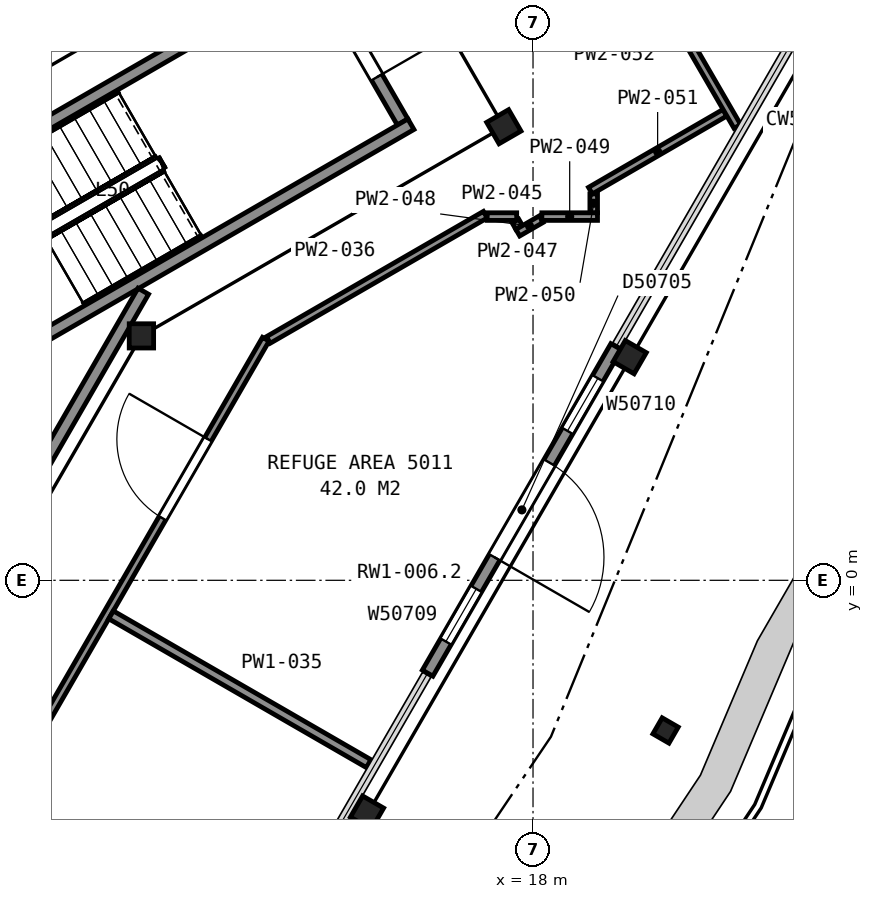
"""IFC4 building model, lengths in metres.
Left out: names, types, materials, properties, quantities, classifications, styles, units other than length and angle.
Written with IfcOpenShell. Run it as: python <this file> out.ifc"""

import sys

from ifc_helpers import new_model, si_unit, direction, frame, frame_2d, origin, origin_2d, place, context, subcontext, project, spatial, rectangle, hollow_rectangle, i_section, extrude, element, fill, save


model = new_model("IFC4")
c1 = context("Model", 3, precision=1e-05, world=origin(), true_north=direction((0.0, 1.0)))
c2 = subcontext(c1, "Body", "Model", "MODEL_VIEW")
j1 = project(units=[si_unit("LENGTHUNIT", "METRE"), si_unit("PLANEANGLEUNIT", "RADIAN")], contexts=[c1])
p1 = place(None, origin())
s1 = spatial("IfcSite", under=j1, at=p1, CompositionType="ELEMENT")
p2 = place(p1, origin())
s2 = spatial("IfcBuilding", under=s1, at=p2, CompositionType="ELEMENT")
p3 = place(p2, frame((0.0, 0.0, 200.6)))
s3 = spatial("IfcBuildingStorey", under=s2, at=p3, CompositionType="ELEMENT", Elevation=200.6)
for number, where, z_axis, x_axis in (
    (1, (15.27, -3.82, -0.16), (0.0, 0.0, 1.0), (-0.5, -0.866, 0.0)),
    (2, (19.59, 3.67, -0.16), (0.0, 0.0, 1.0), (-0.5, -0.866, 0.0)),
):
    element("IfcColumn", number, at=place(p3, frame(where, z_axis=z_axis, x_axis=x_axis)), inside=s3, PredefinedType="COLUMN", context=c2, shape_type="SweptSolid", body=[
        extrude(i_section(OverallWidth=0.401, OverallDepth=0.399, WebThickness=0.025, FlangeThickness=0.04, FilletRadius=0.015, at=origin_2d()), origin(), (0.0, 0.0, 1.0), 5.96),
    ])
p4 = place(p3, frame((11.56, 4.02, 0.0), z_axis=(0.0, 0.0, 1.0), x_axis=(1.0, 0.0, 0.0)))
e3 = element("IfcColumn", 3, at=p4, inside=s3, PredefinedType="COLUMN", context=c2, shape_type="SweptSolid", body=[
    extrude(i_section(OverallWidth=0.401, OverallDepth=0.399, WebThickness=0.025, FlangeThickness=0.04, FilletRadius=0.015, at=origin_2d()), origin(), (0.0, 0.0, 1.0), 5.8),
])
p5 = place(p3, frame((17.52, 7.46, 0.0), z_axis=(0.0, 0.0, 1.0), x_axis=(0.5, -0.866025403784, 0.0)))
e4 = element("IfcColumn", 4, at=p5, inside=s3, PredefinedType="COLUMN", context=c2, shape_type="SweptSolid", body=[
    extrude(i_section(OverallWidth=0.406, OverallDepth=0.417, WebThickness=0.03, FlangeThickness=0.048, FilletRadius=0.015, at=origin_2d()), origin(), (0.0, 0.0, 1.0), 5.8),
])
p6 = place(p3, frame((20.18, -2.47, -0.69), z_axis=(0.0, 0.0, 1.0), x_axis=(-0.5, -0.866025403784, 0.0)))
e5 = element("IfcColumn", 5, at=p6, inside=s3, PredefinedType="COLUMN", context=c2, shape_type="SweptSolid", body=[
    extrude(hollow_rectangle(XDim=0.305, YDim=0.305, WallThickness=0.013, InnerFilletRadius=0.006, OuterFilletRadius=0.019, at=origin_2d()), origin(), (0.0, 0.0, 1.0), 5.4),
])
p7 = place(p3, frame((16.267, -1.527, 0.0), z_axis=(0.0, 0.0, 1.0), x_axis=(0.499997426962, 0.866026889324, 0.0)))
e6 = element("IfcWall", 6, at=p7, inside=s3, PredefinedType="SOLIDWALL", context=c2, shape_type="SweptSolid", body=[
    extrude(rectangle(XDim=6.2, YDim=0.2, at=frame_2d((3.1, 0.0))), origin(), (0.0, 0.0, 1.0), 4.522),
])
p8 = place(p7, frame((0.6, 0.0, 0.9)))
e7 = element("IfcOpeningElement", 7, at=p8, cuts=e6, PredefinedType="OPENING", context=c2, shape_type="SweptSolid", body=[
    extrude(rectangle(XDim=1.0, YDim=1.5, at=frame_2d((0.5, 0.75))), frame((0.0, 0.11, 0.0), z_axis=(0.0, -1.0, 0.0), x_axis=(1.0, 0.0, 0.0)), (0.0, 0.0, 1.0), 0.22),
])
p9 = place(p7, frame((2.2, 0.0, 0.0)))
e8 = element("IfcOpeningElement", 8, at=p9, cuts=e6, PredefinedType="OPENING", context=c2, shape_type="SweptSolid", body=[
    extrude(rectangle(XDim=1.8, YDim=2.4, at=frame_2d((0.9, 1.2))), frame((0.0, 0.11, 0.0), z_axis=(0.0, -1.0, 0.0), x_axis=(1.0, 0.0, 0.0)), (0.0, 0.0, 1.0), 0.22),
])
p10 = place(p7, frame((4.6, 0.0, 0.9)))
e9 = element("IfcOpeningElement", 9, at=p10, cuts=e6, PredefinedType="OPENING", context=c2, shape_type="SweptSolid", body=[
    extrude(rectangle(XDim=1.0, YDim=1.5, at=frame_2d((0.5, 0.75))), frame((0.0, 0.11, 0.0), z_axis=(0.0, -1.0, 0.0), x_axis=(1.0, 0.0, 0.0)), (0.0, 0.0, 1.0), 0.22),
])
p11 = place(p3, frame((15.855, 7.538, 0.0), z_axis=(0.0, 0.0, 1.0), x_axis=(-0.500049511043, 0.865996816683, 0.0)))
e10 = element("IfcWall", 10, at=p11, inside=s3, PredefinedType="PARTITIONING", context=c2, shape_type="SweptSolid", body=[
    extrude(rectangle(XDim=2.8, YDim=0.2, at=frame_2d((1.4, 0.0))), origin(), (0.0, 0.0, 1.0), 5.55),
])
p12 = place(p11, frame((0.85, 0.0, 0.0)))
e11 = element("IfcOpeningElement", 11, at=p12, cuts=e10, PredefinedType="OPENING", context=c2, shape_type="SweptSolid", body=[
    extrude(rectangle(XDim=1.1, YDim=2.1, at=frame_2d((0.55, 1.05))), frame((0.0, 0.11, 0.0), z_axis=(0.0, -1.0, 0.0), x_axis=(1.0, 0.0, 0.0)), (0.0, 0.0, 1.0), 0.22),
])
for number, where, z_axis, x_axis in (
    (12, (6.178, 5.299, 0.0), (0.0, 0.0, 1.0), (0.866, 0.5, 0.0)),
    (13, (7.678, 2.701, 0.0), (0.0, 0.0, 1.0), (0.866, 0.5, 0.0)),
):
    element("IfcWall", number, at=place(p3, frame(where, z_axis=z_axis, x_axis=x_axis)), inside=s3, PredefinedType="PARTITIONING", context=c2, shape_type="SweptSolid", body=[
        extrude(rectangle(XDim=9.6, YDim=0.2, at=frame_2d((4.8, 0.0))), origin(), (0.0, 0.0, 1.0), 5.55),
    ])
p13 = place(p3, frame((9.803, 1.658, 0.0), z_axis=(0.0, 0.0, 1.0), x_axis=(0.499943114462, 0.866058244174, 0.0)))
e14 = element("IfcWall", 14, at=p13, inside=s3, PredefinedType="PARTITIONING", context=c2, shape_type="SweptSolid", body=[
    extrude(rectangle(XDim=3.576, YDim=0.2, at=frame_2d((1.788, 0.0))), origin(), (0.0, 0.0, 1.0), 5.55),
])
p14 = place(p3, frame((13.605, 3.965, 0.0), z_axis=(0.0, 0.0, 1.0), x_axis=(-0.499989213553, -0.866031631253, 0.0)))
e15 = element("IfcWall", 15, at=p14, inside=s3, PredefinedType="PARTITIONING", context=c2, shape_type="SweptSolid", body=[
    extrude(rectangle(XDim=19.41, YDim=0.125, at=frame_2d((9.705, 0.0))), origin(), (0.0, 0.0, 1.0), 4.462),
])
p15 = place(p14, frame((1.899, 0.0, 0.0)))
e16 = element("IfcOpeningElement", 16, at=p15, cuts=e15, PredefinedType="OPENING", context=c2, shape_type="SweptSolid", body=[
    extrude(rectangle(XDim=1.5, YDim=2.1, at=frame_2d((0.75, 1.05))), frame((0.0, 0.073, 0.0), z_axis=(0.0, -1.0, 0.0), x_axis=(1.0, 0.0, 0.0)), (0.0, 0.0, 1.0), 0.145),
])
p16 = place(p3, frame((11.06, -0.568, 0.0), z_axis=(0.0, 0.0, 1.0), x_axis=(0.865980327456, -0.500078066365, 0.0)))
e17 = element("IfcWall", 17, at=p16, inside=s3, PredefinedType="PARTITIONING", context=c2, shape_type="SweptSolid", body=[
    extrude(rectangle(XDim=4.893, YDim=0.15, at=frame_2d((2.446, 0.0))), origin(), (0.0, 0.0, 1.0), 4.462),
])
p17 = place(p3, frame((13.648, 3.954, 0.0), z_axis=(0.0, 0.0, 1.0), x_axis=(0.866031617834, 0.499989236795, 0.0)))
e18 = element("IfcWall", 18, at=p17, inside=s3, PredefinedType="PARTITIONING", context=c2, shape_type="SweptSolid", body=[
    extrude(rectangle(XDim=4.119, YDim=0.125, at=frame_2d((2.06, 0.0))), origin(), (0.0, 0.0, 1.0), 4.462),
])
p18 = place(p3, frame((17.246, 5.982, 0.0), z_axis=(0.0, 0.0, 1.0), x_axis=(1.0, 0.0, 0.0)))
e19 = element("IfcWall", 19, at=p18, inside=s3, PredefinedType="PARTITIONING", context=c2, shape_type="SweptSolid", body=[
    extrude(rectangle(XDim=0.485, YDim=0.125, at=frame_2d((0.243, 0.0))), origin(), (0.0, 0.0, 1.0), 4.462),
])
p19 = place(p3, frame((17.711, 5.908, 0.0), z_axis=(0.0, 0.0, 1.0), x_axis=(0.499195341736, -0.86648947529, 0.0)))
e20 = element("IfcWall", 20, at=p19, inside=s3, PredefinedType="PARTITIONING", context=c2, shape_type="SweptSolid", body=[
    extrude(rectangle(XDim=0.12, YDim=0.125, at=frame_2d((0.06, 0.0))), origin(), (0.0, 0.0, 1.0), 4.462),
])
p20 = place(p3, frame((17.75, 5.717, 0.0), z_axis=(0.0, 0.0, 1.0), x_axis=(0.865150363836, 0.501512560116, 0.0)))
e21 = element("IfcWall", 21, at=p20, inside=s3, PredefinedType="PARTITIONING", context=c2, shape_type="SweptSolid", body=[
    extrude(rectangle(XDim=0.444, YDim=0.125, at=frame_2d((0.222, 0.0))), origin(), (0.0, 0.0, 1.0), 4.462),
])
p21 = place(p3, frame((18.146, 5.982, 0.0), z_axis=(0.0, 0.0, 1.0), x_axis=(1.0, 0.0, 0.0)))
e22 = element("IfcWall", 22, at=p21, inside=s3, PredefinedType="PARTITIONING", context=c2, shape_type="SweptSolid", body=[
    extrude(rectangle(XDim=0.915, YDim=0.125, at=frame_2d((0.458, 0.0))), origin(), (0.0, 0.0, 1.0), 4.462),
])
p22 = place(p3, frame((18.998, 6.047, 0.0), z_axis=(0.0, 0.0, 1.0), x_axis=(0.0, 1.0, 0.0)))
e23 = element("IfcWall", 23, at=p22, inside=s3, PredefinedType="PARTITIONING", context=c2, shape_type="SweptSolid", body=[
    extrude(rectangle(XDim=0.308, YDim=0.125, at=frame_2d((0.154, 0.0))), origin(), (0.0, 0.0, 1.0), 4.462),
])
p23 = place(p3, frame((18.944, 6.409, 0.0), z_axis=(0.0, 0.0, 1.0), x_axis=(0.865299783161, 0.501254710961, 0.0)))
e24 = element("IfcWall", 24, at=p23, inside=s3, PredefinedType="PARTITIONING", context=c2, shape_type="SweptSolid", body=[
    extrude(rectangle(XDim=2.555, YDim=0.125, at=frame_2d((1.278, 0.0))), origin(), (0.0, 0.0, 1.0), 4.462),
])
p24 = place(p3, frame((19.553, 10.584, 0.0), z_axis=(0.0, 0.0, 1.0), x_axis=(0.501337933971, -0.86525156802, 0.0)))
e25 = element("IfcWall", 25, at=p24, inside=s3, PredefinedType="PARTITIONING", context=c2, shape_type="SweptSolid", body=[
    extrude(rectangle(XDim=3.604, YDim=0.125, at=frame_2d((1.802, 0.0))), origin(), (0.0, 0.0, 1.0), 4.462),
])
p25 = place(p8, origin())
e26 = element("IfcWindow", 26, at=p25, inside=s3, PartitioningType="SINGLE_PANEL", PredefinedType="WINDOW", context=c2, shape_type="SweptSolid", body=[
    extrude(rectangle(XDim=1.0, YDim=1.5, at=frame_2d((0.5, 0.75))), frame((0.0, 0.03, 0.0), z_axis=(0.0, -1.0, 0.0), x_axis=(1.0, 0.0, 0.0)), (0.0, 0.0, 1.0), 0.06),
])
fill(e7, e26)
p26 = place(p9, frame((1.8, 0.0, 0.0), z_axis=(0.0, 0.0, 1.0), x_axis=(-1.0, 0.0, 0.0)))
e27 = element("IfcDoor", 27, at=p26, inside=s3, OperationType="DOUBLE_DOOR_SINGLE_SWING", PredefinedType="DOOR", context=c2, shape_type="SweptSolid", body=[
    extrude(rectangle(XDim=1.8, YDim=2.4, at=frame_2d((0.9, 1.2))), frame((0.0, 0.025, 0.0), z_axis=(0.0, -1.0, 0.0), x_axis=(1.0, 0.0, 0.0)), (0.0, 0.0, 1.0), 0.05),
])
fill(e8, e27)
p27 = place(p10, origin())
e28 = element("IfcWindow", 28, at=p27, inside=s3, PartitioningType="SINGLE_PANEL", PredefinedType="WINDOW", context=c2, shape_type="SweptSolid", body=[
    extrude(rectangle(XDim=1.0, YDim=1.5, at=frame_2d((0.5, 0.75))), frame((0.0, 0.03, 0.0), z_axis=(0.0, -1.0, 0.0), x_axis=(1.0, 0.0, 0.0)), (0.0, 0.0, 1.0), 0.06),
])
fill(e9, e28)
p28 = place(p12, origin())
e29 = element("IfcDoor", 29, at=p28, inside=s3, OperationType="SINGLE_SWING_LEFT", PredefinedType="DOOR", context=c2, shape_type="SweptSolid", body=[
    extrude(rectangle(XDim=1.1, YDim=2.1, at=frame_2d((0.55, 1.05))), frame((0.0, 0.025, 0.0), z_axis=(0.0, -1.0, 0.0), x_axis=(1.0, 0.0, 0.0)), (0.0, 0.0, 1.0), 0.05),
])
fill(e11, e29)
p29 = place(p15, origin())
e30 = element("IfcDoor", 30, at=p29, inside=s3, OperationType="DOUBLE_DOOR_SINGLE_SWING", PredefinedType="DOOR", context=c2, shape_type="SweptSolid", body=[
    extrude(rectangle(XDim=1.5, YDim=2.1, at=frame_2d((0.75, 1.05))), frame((0.0, 0.025, 0.0), z_axis=(0.0, -1.0, 0.0), x_axis=(1.0, 0.0, 0.0)), (0.0, 0.0, 1.0), 0.05),
])
fill(e16, e30)
save(model, sys.argv[1])
